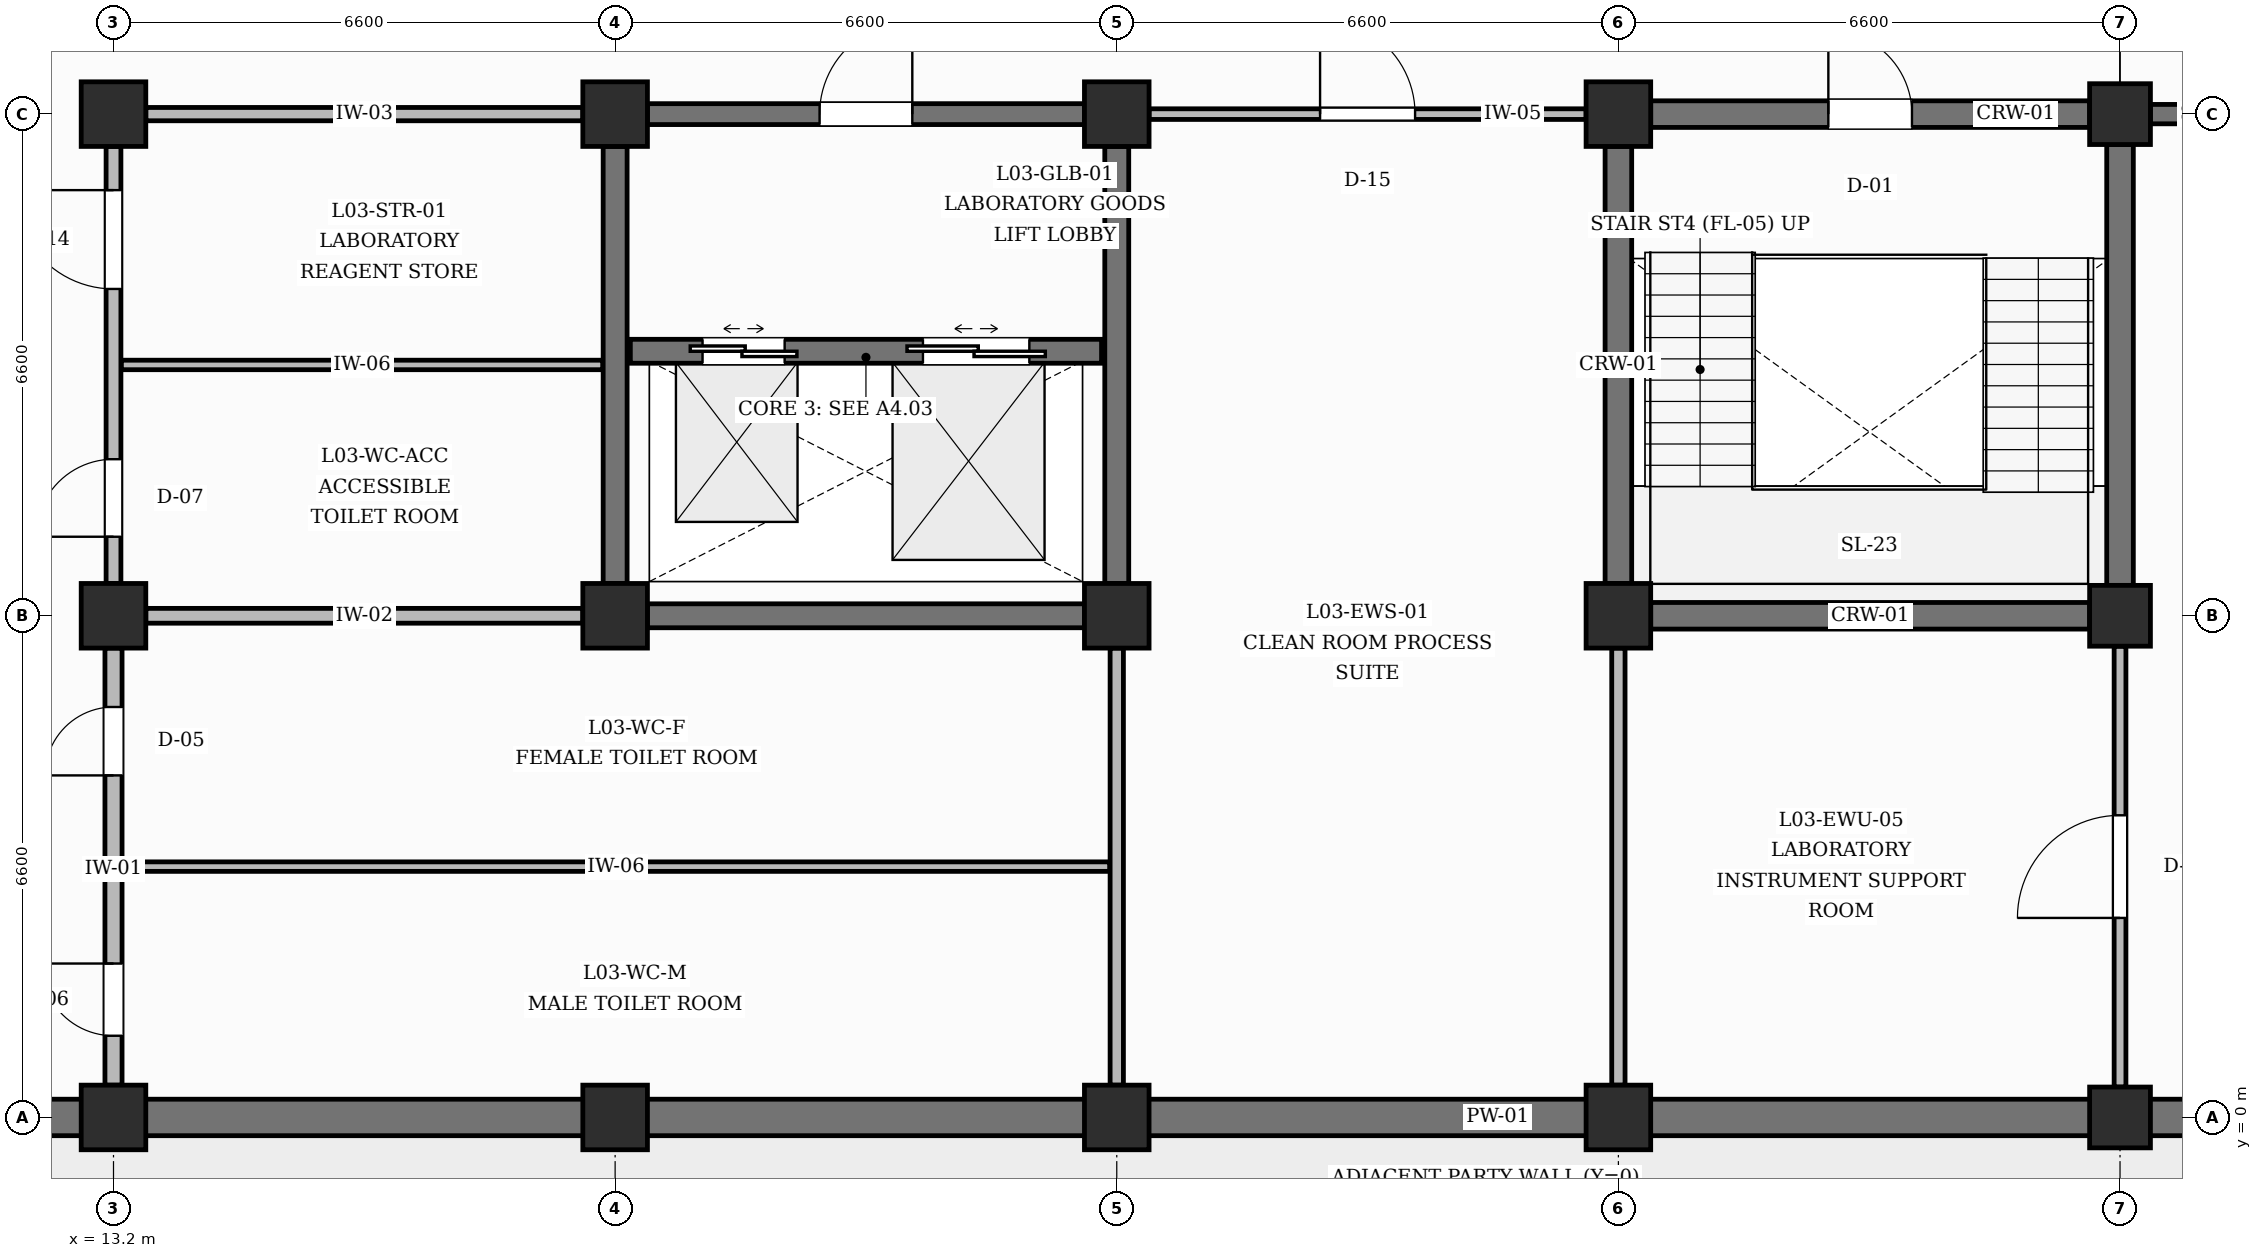
"""IFC4 building model, lengths in metres.
Left out: names, types, materials, properties, quantities, classifications, styles, units other than length and angle.
Written with IfcOpenShell. Run it as: python <this file> out.ifc"""

import sys

from ifc_helpers import new_model, si_unit, direction, frame, frame_2d, origin, origin_2d, place, context, subcontext, project, spatial, rectangle, extrude, element, fill, save


model = new_model("IFC4")
c1 = context("Model", 3, precision=1e-05, world=origin(), true_north=direction((0.0, 1.0)))
c2 = subcontext(c1, "Body", "Model", "MODEL_VIEW")
j1 = project(units=[si_unit("LENGTHUNIT", "METRE"), si_unit("PLANEANGLEUNIT", "RADIAN")], contexts=[c1])
p1 = place(None, origin())
s1 = spatial("IfcSite", under=j1, at=p1, CompositionType="ELEMENT")
p2 = place(p1, origin())
s2 = spatial("IfcBuilding", under=s1, at=p2, CompositionType="ELEMENT")
p3 = place(p2, frame((0.0, 0.0, 14.4)))
s3 = spatial("IfcBuildingStorey", under=s2, at=p3, CompositionType="ELEMENT", Elevation=14.4)
for number, where, z_axis, x_axis in (
    (1, (13.2, 0.0, 0.0), (0.0, 0.0, 1.0), (1.0, 0.0, 0.0)),
    (2, (13.2, 6.6, 0.0), (0.0, 0.0, 1.0), (1.0, 0.0, 0.0)),
    (3, (13.2, 13.2, 0.0), (0.0, 0.0, 1.0), (1.0, 0.0, 0.0)),
    (4, (19.8, 0.0, 0.0), (0.0, 0.0, 1.0), (1.0, 0.0, 0.0)),
    (5, (19.8, 6.6, 0.0), (0.0, 0.0, 1.0), (1.0, 0.0, 0.0)),
    (6, (19.8, 13.2, 0.0), (0.0, 0.0, 1.0), (1.0, 0.0, 0.0)),
    (7, (26.4, 0.0, 0.0), (0.0, 0.0, 1.0), (1.0, 0.0, 0.0)),
    (8, (26.4, 6.6, 0.0), (0.0, 0.0, 1.0), (1.0, 0.0, 0.0)),
    (9, (26.4, 13.2, 0.0), (0.0, 0.0, 1.0), (1.0, 0.0, 0.0)),
    (10, (33.0, 0.0, 0.0), (0.0, 0.0, 1.0), (1.0, 0.0, 0.0)),
    (11, (33.0, 6.6, 0.0), (0.0, 0.0, 1.0), (1.0, 0.0, 0.0)),
    (12, (33.0, 13.2, 0.0), (0.0, 0.0, 1.0), (1.0, 0.0, 0.0)),
):
    element("IfcColumn", number, at=place(p3, frame(where, z_axis=z_axis, x_axis=x_axis)), inside=s3, PredefinedType="COLUMN", context=c2, shape_type="SweptSolid", body=[
        extrude(rectangle(XDim=0.85, YDim=0.85, at=origin_2d()), origin(), (0.0, 0.0, 1.0), 4.2),
    ])
for number, where, z_axis, x_axis in (
    (13, (39.6, 0.0, 0.0), (0.0, 0.0, 1.0), (1.0, 0.0, 0.0)),
    (14, (39.6, 6.6, 0.0), (0.0, 0.0, 1.0), (1.0, 0.0, 0.0)),
    (15, (39.6, 13.2, 0.0), (0.0, 0.0, 1.0), (1.0, 0.0, 0.0)),
):
    element("IfcColumn", number, at=place(p3, frame(where, z_axis=z_axis, x_axis=x_axis)), inside=s3, PredefinedType="COLUMN", context=c2, shape_type="SweptSolid", body=[
        extrude(rectangle(XDim=0.8, YDim=0.8, at=origin_2d()), origin(), (0.0, 0.0, 1.0), 4.2),
    ])
for number, where, z_axis, x_axis in (
    (16, (7.025, 0.0, 0.0), (0.0, 0.0, 1.0), (1.0, 0.0, 0.0)),
    (17, (13.625, 0.0, 0.0), (0.0, 0.0, 1.0), (1.0, 0.0, 0.0)),
    (18, (20.225, 0.0, 0.0), (0.0, 0.0, 1.0), (1.0, 0.0, 0.0)),
    (19, (26.825, 0.0, 0.0), (0.0, 0.0, 1.0), (1.0, 0.0, 0.0)),
):
    element("IfcWall", number, at=place(p3, frame(where, z_axis=z_axis, x_axis=x_axis)), inside=s3, PredefinedType="SOLIDWALL", context=c2, shape_type="SweptSolid", body=[
        extrude(rectangle(XDim=5.75, YDim=0.48, at=frame_2d((2.875, 0.0))), origin(), (0.0, 0.0, 1.0), 3.26),
    ])
p4 = place(p3, frame((33.425, 0.0, 0.0), z_axis=(0.0, 0.0, 1.0), x_axis=(1.0, 0.0, 0.0)))
e20 = element("IfcWall", 20, at=p4, inside=s3, PredefinedType="SOLIDWALL", context=c2, shape_type="SweptSolid", body=[
    extrude(rectangle(XDim=5.775, YDim=0.48, at=frame_2d((2.887, 0.0))), origin(), (0.0, 0.0, 1.0), 3.26),
])
p5 = place(p3, frame((40.0, 0.0, 0.0), z_axis=(0.0, 0.0, 1.0), x_axis=(1.0, 0.0, 0.0)))
e21 = element("IfcWall", 21, at=p5, inside=s3, PredefinedType="SOLIDWALL", context=c2, shape_type="SweptSolid", body=[
    extrude(rectangle(XDim=5.8, YDim=0.48, at=frame_2d((2.9, 0.0))), origin(), (0.0, 0.0, 1.0), 3.26),
])
p6 = place(p3, frame((33.425, 6.6, 0.0), z_axis=(0.0, 0.0, 1.0), x_axis=(1.0, 0.0, 0.0)))
e22 = element("IfcWall", 22, at=p6, inside=s3, PredefinedType="SHEAR", context=c2, shape_type="SweptSolid", body=[
    extrude(rectangle(XDim=5.775, YDim=0.35, at=frame_2d((2.887, 0.0))), origin(), (0.0, 0.0, 1.0), 3.16),
])
p7 = place(p3, frame((33.425, 13.2, 0.0), z_axis=(0.0, 0.0, 1.0), x_axis=(1.0, 0.0, 0.0)))
e23 = element("IfcWall", 23, at=p7, inside=s3, PredefinedType="SHEAR", context=c2, shape_type="SweptSolid", body=[
    extrude(rectangle(XDim=5.775, YDim=0.35, at=frame_2d((2.887, 0.0))), origin(), (0.0, 0.0, 1.0), 3.16),
])
p8 = place(p7, frame((2.337, 0.0, 0.0)))
e24 = element("IfcOpeningElement", 24, at=p8, cuts=e23, PredefinedType="OPENING", context=c2, shape_type="SweptSolid", body=[
    extrude(rectangle(XDim=1.1, YDim=2.15, at=frame_2d((0.55, 1.075))), frame((0.0, 0.185, 0.0), z_axis=(0.0, -1.0, 0.0), x_axis=(1.0, 0.0, 0.0)), (0.0, 0.0, 1.0), 0.37),
])
p9 = place(p3, frame((33.0, 7.025, 0.0), z_axis=(0.0, 0.0, 1.0), x_axis=(0.0, 1.0, 0.0)))
e25 = element("IfcWall", 25, at=p9, inside=s3, PredefinedType="SHEAR", context=c2, shape_type="SweptSolid", body=[
    extrude(rectangle(XDim=5.75, YDim=0.35, at=frame_2d((2.875, 0.0))), origin(), (0.0, 0.0, 1.0), 3.16),
])
p10 = place(p3, frame((39.6, 7.0, 0.0), z_axis=(0.0, 0.0, 1.0), x_axis=(0.0, 1.0, 0.0)))
e26 = element("IfcWall", 26, at=p10, inside=s3, PredefinedType="SHEAR", context=c2, shape_type="SweptSolid", body=[
    extrude(rectangle(XDim=5.8, YDim=0.35, at=frame_2d((2.9, 0.0))), origin(), (0.0, 0.0, 1.0), 3.16),
])
for number, where, z_axis, x_axis in (
    (27, (20.225, 6.6, 0.0), (0.0, 0.0, 1.0), (1.0, 0.0, 0.0)),
    (28, (19.8, 7.025, 0.0), (0.0, 0.0, 1.0), (0.0, 1.0, 0.0)),
    (29, (26.4, 7.025, 0.0), (0.0, 0.0, 1.0), (0.0, 1.0, 0.0)),
):
    element("IfcWall", number, at=place(p3, frame(where, z_axis=z_axis, x_axis=x_axis)), inside=s3, PredefinedType="SHEAR", context=c2, shape_type="SweptSolid", body=[
        extrude(rectangle(XDim=5.75, YDim=0.315, at=frame_2d((2.875, 0.0))), origin(), (0.0, 0.0, 1.0), 3.16),
    ])
p11 = place(p3, frame((20.225, 13.2, 0.0), z_axis=(0.0, 0.0, 1.0), x_axis=(1.0, 0.0, 0.0)))
e30 = element("IfcWall", 30, at=p11, inside=s3, PredefinedType="SHEAR", context=c2, shape_type="SweptSolid", body=[
    extrude(rectangle(XDim=5.75, YDim=0.275, at=frame_2d((2.875, 0.0))), origin(), (0.0, 0.0, 1.0), 3.16),
])
p12 = place(p11, frame((2.265, 0.0, 0.0)))
e31 = element("IfcOpeningElement", 31, at=p12, cuts=e30, PredefinedType="OPENING", context=c2, shape_type="SweptSolid", body=[
    extrude(rectangle(XDim=1.22, YDim=2.15, at=frame_2d((0.61, 1.075))), frame((0.0, 0.147, 0.0), z_axis=(0.0, -1.0, 0.0), x_axis=(1.0, 0.0, 0.0)), (0.0, 0.0, 1.0), 0.295),
])
p13 = place(p3, frame((20.0, 10.08, 0.0), z_axis=(0.0, 0.0, 1.0), x_axis=(1.0, 0.0, 0.0)))
e32 = element("IfcWall", 32, at=p13, inside=s3, PredefinedType="SHEAR", context=c2, shape_type="SweptSolid", body=[
    extrude(rectangle(XDim=6.2, YDim=0.315, at=frame_2d((3.1, 0.0))), origin(), (0.0, 0.0, 1.0), 3.86),
])
p14 = place(p13, frame((0.95, 0.0, 0.0)))
e33 = element("IfcOpeningElement", 33, at=p14, cuts=e32, PredefinedType="OPENING", context=c2, shape_type="SweptSolid", body=[
    extrude(rectangle(XDim=1.08, YDim=2.15, at=frame_2d((0.54, 1.075))), frame((0.0, 0.167, 0.0), z_axis=(0.0, -1.0, 0.0), x_axis=(1.0, 0.0, 0.0)), (0.0, 0.0, 1.0), 0.335),
])
p15 = place(p13, frame((3.85, 0.0, 0.0)))
e34 = element("IfcOpeningElement", 34, at=p15, cuts=e32, PredefinedType="OPENING", context=c2, shape_type="SweptSolid", body=[
    extrude(rectangle(XDim=1.4, YDim=2.35, at=frame_2d((0.7, 1.175))), frame((0.0, 0.167, 0.0), z_axis=(0.0, -1.0, 0.0), x_axis=(1.0, 0.0, 0.0)), (0.0, 0.0, 1.0), 0.335),
])
p16 = place(p3, frame((13.2, 0.425, 0.0), z_axis=(0.0, 0.0, 1.0), x_axis=(0.0, 1.0, 0.0)))
e35 = element("IfcWall", 35, at=p16, inside=s3, PredefinedType="PARTITIONING", context=c2, shape_type="SweptSolid", body=[
    extrude(rectangle(XDim=5.75, YDim=0.225, at=frame_2d((2.875, 0.0))), origin(), (0.0, 0.0, 1.0), 3.16),
])
p17 = place(p16, frame((0.65, 0.0, 0.0)))
e36 = element("IfcOpeningElement", 36, at=p17, cuts=e35, PredefinedType="OPENING", context=c2, shape_type="SweptSolid", body=[
    extrude(rectangle(XDim=0.95, YDim=2.1, at=frame_2d((0.475, 1.05))), frame((0.0, 0.123, 0.0), z_axis=(0.0, -1.0, 0.0), x_axis=(1.0, 0.0, 0.0)), (0.0, 0.0, 1.0), 0.245),
])
p18 = place(p16, frame((4.075, 0.0, 0.0)))
e37 = element("IfcOpeningElement", 37, at=p18, cuts=e35, PredefinedType="OPENING", context=c2, shape_type="SweptSolid", body=[
    extrude(rectangle(XDim=0.9, YDim=2.1, at=frame_2d((0.45, 1.05))), frame((0.0, 0.123, 0.0), z_axis=(0.0, -1.0, 0.0), x_axis=(1.0, 0.0, 0.0)), (0.0, 0.0, 1.0), 0.245),
])
p19 = place(p3, frame((26.4, 0.425, 0.0), z_axis=(0.0, 0.0, 1.0), x_axis=(0.0, 1.0, 0.0)))
e38 = element("IfcWall", 38, at=p19, inside=s3, PredefinedType="PARTITIONING", context=c2, shape_type="SweptSolid", body=[
    extrude(rectangle(XDim=5.75, YDim=0.175, at=frame_2d((2.875, 0.0))), origin(), (0.0, 0.0, 1.0), 3.16),
])
p20 = place(p3, frame((13.625, 6.6, 0.0), z_axis=(0.0, 0.0, 1.0), x_axis=(1.0, 0.0, 0.0)))
e39 = element("IfcWall", 39, at=p20, inside=s3, PredefinedType="PARTITIONING", context=c2, shape_type="SweptSolid", body=[
    extrude(rectangle(XDim=5.75, YDim=0.195, at=frame_2d((2.875, 0.0))), origin(), (0.0, 0.0, 1.0), 3.16),
])
p21 = place(p3, frame((13.2, 7.025, 0.0), z_axis=(0.0, 0.0, 1.0), x_axis=(0.0, 1.0, 0.0)))
e40 = element("IfcWall", 40, at=p21, inside=s3, PredefinedType="PARTITIONING", context=c2, shape_type="SweptSolid", body=[
    extrude(rectangle(XDim=5.75, YDim=0.195, at=frame_2d((2.875, 0.0))), origin(), (0.0, 0.0, 1.0), 3.16),
])
p22 = place(p21, frame((0.615, 0.0, 0.0)))
e41 = element("IfcOpeningElement", 41, at=p22, cuts=e40, PredefinedType="OPENING", context=c2, shape_type="SweptSolid", body=[
    extrude(rectangle(XDim=1.02, YDim=2.15, at=frame_2d((0.51, 1.075))), frame((0.0, 0.107, 0.0), z_axis=(0.0, -1.0, 0.0), x_axis=(1.0, 0.0, 0.0)), (0.0, 0.0, 1.0), 0.215),
])
p23 = place(p21, frame((3.875, 0.0, 0.0)))
e42 = element("IfcOpeningElement", 42, at=p23, cuts=e40, PredefinedType="OPENING", context=c2, shape_type="SweptSolid", body=[
    extrude(rectangle(XDim=1.3, YDim=2.3, at=frame_2d((0.65, 1.15))), frame((0.0, 0.107, 0.0), z_axis=(0.0, -1.0, 0.0), x_axis=(1.0, 0.0, 0.0)), (0.0, 0.0, 1.0), 0.215),
])
for number, where, z_axis, x_axis in (
    (43, (13.625, 13.2, 0.0), (0.0, 0.0, 1.0), (1.0, 0.0, 0.0)),
    (44, (33.0, 0.425, 0.0), (0.0, 0.0, 1.0), (0.0, 1.0, 0.0)),
):
    element("IfcWall", number, at=place(p3, frame(where, z_axis=z_axis, x_axis=x_axis)), inside=s3, PredefinedType="PARTITIONING", context=c2, shape_type="SweptSolid", body=[
        extrude(rectangle(XDim=5.75, YDim=0.175, at=frame_2d((2.875, 0.0))), origin(), (0.0, 0.0, 1.0), 3.16),
    ])
p24 = place(p3, frame((26.825, 13.2, 0.0), z_axis=(0.0, 0.0, 1.0), x_axis=(1.0, 0.0, 0.0)))
e45 = element("IfcWall", 45, at=p24, inside=s3, PredefinedType="PARTITIONING", context=c2, shape_type="SweptSolid", body=[
    extrude(rectangle(XDim=5.75, YDim=0.14, at=frame_2d((2.875, 0.0))), origin(), (0.0, 0.0, 1.0), 3.16),
])
p25 = place(p24, frame((2.25, 0.0, 0.0)))
e46 = element("IfcOpeningElement", 46, at=p25, cuts=e45, PredefinedType="OPENING", context=c2, shape_type="SweptSolid", body=[
    extrude(rectangle(XDim=1.25, YDim=2.25, at=frame_2d((0.625, 1.125))), frame((0.0, 0.08, 0.0), z_axis=(0.0, -1.0, 0.0), x_axis=(1.0, 0.0, 0.0)), (0.0, 0.0, 1.0), 0.16),
])
p26 = place(p3, frame((39.6, 0.4, 0.0), z_axis=(0.0, 0.0, 1.0), x_axis=(0.0, 1.0, 0.0)))
e47 = element("IfcWall", 47, at=p26, inside=s3, PredefinedType="PARTITIONING", context=c2, shape_type="SweptSolid", body=[
    extrude(rectangle(XDim=5.8, YDim=0.155, at=frame_2d((2.9, 0.0))), origin(), (0.0, 0.0, 1.0), 3.16),
])
p27 = place(p26, frame((2.225, 0.0, 0.0)))
e48 = element("IfcOpeningElement", 48, at=p27, cuts=e47, PredefinedType="OPENING", context=c2, shape_type="SweptSolid", body=[
    extrude(rectangle(XDim=1.35, YDim=2.3, at=frame_2d((0.675, 1.15))), frame((0.0, 0.087, 0.0), z_axis=(0.0, -1.0, 0.0), x_axis=(1.0, 0.0, 0.0)), (0.0, 0.0, 1.0), 0.175),
])
p28 = place(p3, frame((40.0, 13.2, 0.0), z_axis=(0.0, 0.0, 1.0), x_axis=(1.0, 0.0, 0.0)))
e49 = element("IfcWall", 49, at=p28, inside=s3, PredefinedType="SHEAR", context=c2, shape_type="SweptSolid", body=[
    extrude(rectangle(XDim=5.8, YDim=0.255, at=frame_2d((2.9, 0.0))), origin(), (0.0, 0.0, 1.0), 3.16),
])
p29 = place(p28, frame((2.175, 0.0, 0.0)))
e50 = element("IfcOpeningElement", 50, at=p29, cuts=e49, PredefinedType="OPENING", context=c2, shape_type="SweptSolid", body=[
    extrude(rectangle(XDim=1.45, YDim=2.25, at=frame_2d((0.725, 1.125))), frame((0.0, 0.137, 0.0), z_axis=(0.0, -1.0, 0.0), x_axis=(1.0, 0.0, 0.0)), (0.0, 0.0, 1.0), 0.275),
])
p30 = place(p3, frame((13.317, 3.3, 0.0), z_axis=(0.0, 0.0, 1.0), x_axis=(1.0, 0.0, 0.0)))
e51 = element("IfcWall", 51, at=p30, inside=s3, PredefinedType="PARTITIONING", context=c2, shape_type="SweptSolid", body=[
    extrude(rectangle(XDim=12.99, YDim=0.125, at=frame_2d((6.495, 0.0))), origin(), (0.0, 0.0, 1.0), 3.86),
])
p31 = place(p3, frame((13.302, 9.9, 0.0), z_axis=(0.0, 0.0, 1.0), x_axis=(1.0, 0.0, 0.0)))
e52 = element("IfcWall", 52, at=p31, inside=s3, PredefinedType="PARTITIONING", context=c2, shape_type="SweptSolid", body=[
    extrude(rectangle(XDim=6.335, YDim=0.125, at=frame_2d((3.167, 0.0))), origin(), (0.0, 0.0, 1.0), 3.86),
])
p32 = place(p8, origin())
e53 = element("IfcDoor", 53, at=p32, inside=s3, OperationType="SINGLE_SWING_LEFT", PredefinedType="DOOR", context=c2, shape_type="SweptSolid", body=[
    extrude(rectangle(XDim=1.1, YDim=2.15, at=frame_2d((0.55, 1.075))), frame((0.0, 0.025, 0.0), z_axis=(0.0, -1.0, 0.0), x_axis=(1.0, 0.0, 0.0)), (0.0, 0.0, 1.0), 0.05),
])
fill(e24, e53)
p33 = place(p14, origin())
e54 = element("IfcDoor", 54, at=p33, inside=s3, OperationType="DOUBLE_DOOR_SLIDING", PredefinedType="USERDEFINED", context=c2, shape_type="SweptSolid", body=[
    extrude(rectangle(XDim=1.08, YDim=2.15, at=frame_2d((0.54, 1.075))), frame((0.0, 0.025, 0.0), z_axis=(0.0, -1.0, 0.0), x_axis=(1.0, 0.0, 0.0)), (0.0, 0.0, 1.0), 0.05),
])
fill(e33, e54)
p34 = place(p15, origin())
e55 = element("IfcDoor", 55, at=p34, inside=s3, OperationType="DOUBLE_DOOR_SLIDING", PredefinedType="USERDEFINED", context=c2, shape_type="SweptSolid", body=[
    extrude(rectangle(XDim=1.4, YDim=2.35, at=frame_2d((0.7, 1.175))), frame((0.0, 0.025, 0.0), z_axis=(0.0, -1.0, 0.0), x_axis=(1.0, 0.0, 0.0)), (0.0, 0.0, 1.0), 0.05),
])
fill(e34, e55)
p35 = place(p12, origin())
e56 = element("IfcDoor", 56, at=p35, inside=s3, OperationType="SINGLE_SWING_RIGHT", PredefinedType="DOOR", context=c2, shape_type="SweptSolid", body=[
    extrude(rectangle(XDim=1.22, YDim=2.15, at=frame_2d((0.61, 1.075))), frame((0.0, 0.025, 0.0), z_axis=(0.0, -1.0, 0.0), x_axis=(1.0, 0.0, 0.0)), (0.0, 0.0, 1.0), 0.05),
])
fill(e31, e56)
p36 = place(p17, origin())
e57 = element("IfcDoor", 57, at=p36, inside=s3, OperationType="SINGLE_SWING_RIGHT", PredefinedType="DOOR", context=c2, shape_type="SweptSolid", body=[
    extrude(rectangle(XDim=0.95, YDim=2.1, at=frame_2d((0.475, 1.05))), frame((0.0, 0.025, 0.0), z_axis=(0.0, -1.0, 0.0), x_axis=(1.0, 0.0, 0.0)), (0.0, 0.0, 1.0), 0.05),
])
fill(e36, e57)
p37 = place(p18, origin())
e58 = element("IfcDoor", 58, at=p37, inside=s3, OperationType="SINGLE_SWING_LEFT", PredefinedType="DOOR", context=c2, shape_type="SweptSolid", body=[
    extrude(rectangle(XDim=0.9, YDim=2.1, at=frame_2d((0.45, 1.05))), frame((0.0, 0.025, 0.0), z_axis=(0.0, -1.0, 0.0), x_axis=(1.0, 0.0, 0.0)), (0.0, 0.0, 1.0), 0.05),
])
fill(e37, e58)
p38 = place(p22, origin())
e59 = element("IfcDoor", 59, at=p38, inside=s3, OperationType="SINGLE_SWING_LEFT", PredefinedType="DOOR", context=c2, shape_type="SweptSolid", body=[
    extrude(rectangle(XDim=1.02, YDim=2.15, at=frame_2d((0.51, 1.075))), frame((0.0, 0.025, 0.0), z_axis=(0.0, -1.0, 0.0), x_axis=(1.0, 0.0, 0.0)), (0.0, 0.0, 1.0), 0.05),
])
fill(e41, e59)
p39 = place(p23, origin())
e60 = element("IfcDoor", 60, at=p39, inside=s3, OperationType="SINGLE_SWING_RIGHT", PredefinedType="DOOR", context=c2, shape_type="SweptSolid", body=[
    extrude(rectangle(XDim=1.3, YDim=2.3, at=frame_2d((0.65, 1.15))), frame((0.0, 0.025, 0.0), z_axis=(0.0, -1.0, 0.0), x_axis=(1.0, 0.0, 0.0)), (0.0, 0.0, 1.0), 0.05),
])
fill(e42, e60)
p40 = place(p25, origin())
e61 = element("IfcDoor", 61, at=p40, inside=s3, OperationType="SINGLE_SWING_LEFT", PredefinedType="DOOR", context=c2, shape_type="SweptSolid", body=[
    extrude(rectangle(XDim=1.25, YDim=2.25, at=frame_2d((0.625, 1.125))), frame((0.0, 0.025, 0.0), z_axis=(0.0, -1.0, 0.0), x_axis=(1.0, 0.0, 0.0)), (0.0, 0.0, 1.0), 0.05),
])
fill(e46, e61)
p41 = place(p27, origin())
e62 = element("IfcDoor", 62, at=p41, inside=s3, OperationType="SINGLE_SWING_LEFT", PredefinedType="DOOR", context=c2, shape_type="SweptSolid", body=[
    extrude(rectangle(XDim=1.35, YDim=2.3, at=frame_2d((0.675, 1.15))), frame((0.0, 0.025, 0.0), z_axis=(0.0, -1.0, 0.0), x_axis=(1.0, 0.0, 0.0)), (0.0, 0.0, 1.0), 0.05),
])
fill(e48, e62)
save(model, sys.argv[1])
